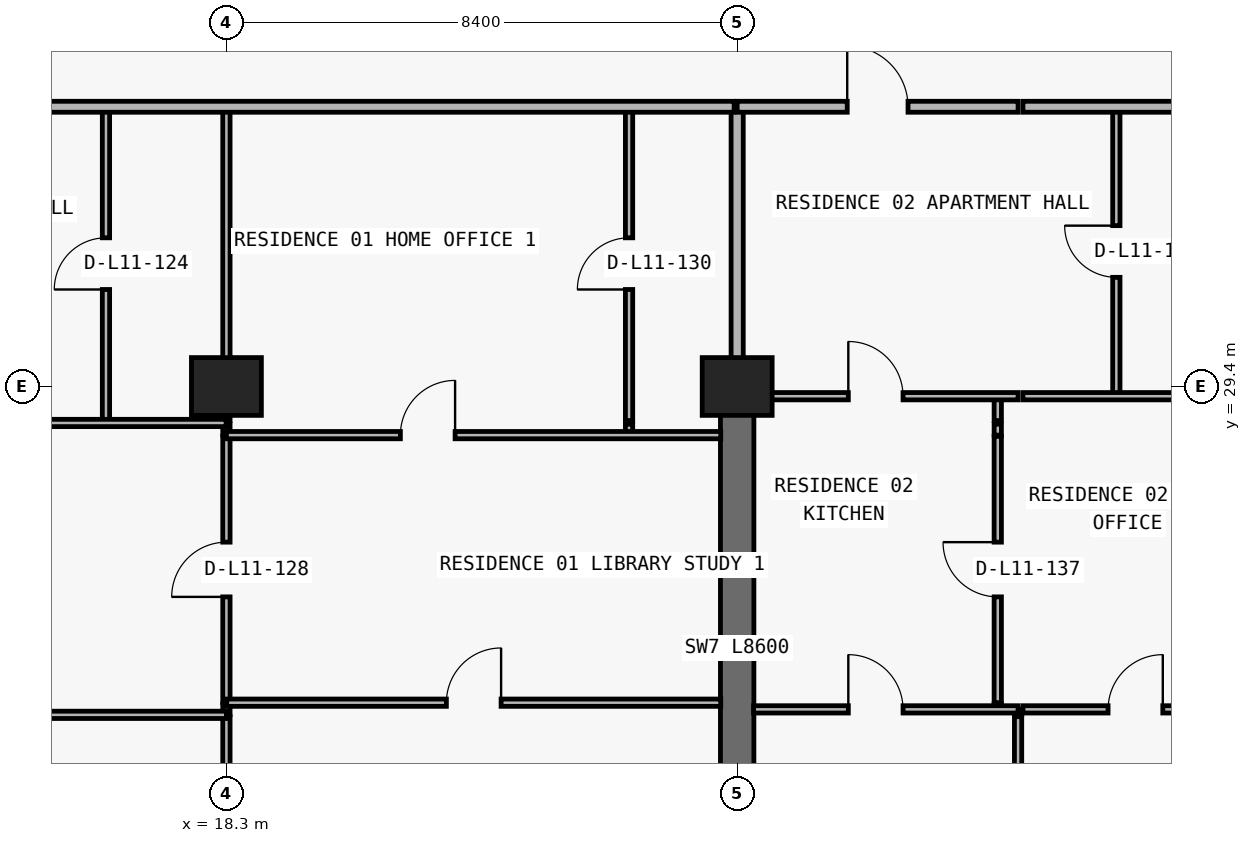
"""IFC4 building model, lengths in metres.
Left out: names, types, materials, properties, quantities, classifications, styles, units other than length and angle.
Written with IfcOpenShell. Run it as: python <this file> out.ifc"""

import sys

from ifc_helpers import new_model, si_unit, direction, frame, frame_2d, origin, origin_2d, place, context, subcontext, project, spatial, rectangle, extrude, element, fill, save


model = new_model("IFC4")
c1 = context("Model", 3, precision=1e-05, world=origin(), true_north=direction((0.0, 1.0)))
c2 = subcontext(c1, "Body", "Model", "MODEL_VIEW")
j1 = project(units=[si_unit("LENGTHUNIT", "METRE"), si_unit("PLANEANGLEUNIT", "RADIAN")], contexts=[c1])
p1 = place(None, origin())
s1 = spatial("IfcSite", under=j1, at=p1, CompositionType="ELEMENT")
p2 = place(p1, origin())
s2 = spatial("IfcBuilding", under=s1, at=p2, CompositionType="ELEMENT")
p3 = place(p2, frame((0.0, 0.0, 46.5)))
s3 = spatial("IfcBuildingStorey", under=s2, at=p3, CompositionType="ELEMENT", Elevation=46.5)
for number, where, z_axis, x_axis in (
    (1, (18.3, 29.4, 0.0), (0.0, 0.0, 1.0), (1.0, 0.0, 0.0)),
    (2, (26.7, 29.4, 0.0), (0.0, 0.0, 1.0), (1.0, 0.0, 0.0)),
):
    element("IfcColumn", number, at=place(p3, frame(where, z_axis=z_axis, x_axis=x_axis)), inside=s3, PredefinedType="COLUMN", context=c2, shape_type="SweptSolid", body=[
        extrude(rectangle(XDim=1.15, YDim=0.95, at=origin_2d()), origin(), (0.0, 0.0, 1.0), 3.05),
    ])
p4 = place(p3, frame((26.7, 20.8, 0.0), z_axis=(0.0, 0.0, 1.0), x_axis=(0.0, 1.0, 0.0)))
e3 = element("IfcWall", 3, at=p4, inside=s3, PredefinedType="SHEAR", context=c2, shape_type="SweptSolid", body=[
    extrude(rectangle(XDim=8.6, YDim=0.55, at=frame_2d((4.3, 0.0))), origin(), (0.0, 0.0, 1.0), 3.05),
])
p5 = place(p3, frame((16.319, 28.84, 0.0), z_axis=(0.0, 0.0, 1.0), x_axis=(0.0, 1.0, 0.0)))
e4 = element("IfcWall", 4, at=p5, inside=s3, PredefinedType="PARTITIONING", context=c2, shape_type="SweptSolid", body=[
    extrude(rectangle(XDim=5.16, YDim=0.12, at=frame_2d((2.58, 0.0))), origin(), (0.0, 0.0, 1.0), 3.05),
])
p6 = place(p5, frame((2.155, 0.0, 0.0)))
e5 = element("IfcOpeningElement", 5, at=p6, cuts=e4, PredefinedType="OPENING", context=c2, shape_type="SweptSolid", body=[
    extrude(rectangle(XDim=0.85, YDim=2.1, at=frame_2d((0.425, 1.05))), frame((0.0, 0.07, 0.0), z_axis=(0.0, -1.0, 0.0), x_axis=(1.0, 0.0, 0.0)), (0.0, 0.0, 1.0), 0.14),
])
p7 = place(p3, frame((18.3, 6.24, 0.0), z_axis=(0.0, 0.0, 1.0), x_axis=(0.0, 1.0, 0.0)))
e6 = element("IfcWall", 6, at=p7, inside=s3, PredefinedType="PARTITIONING", context=c2, shape_type="SweptSolid", body=[
    extrude(rectangle(XDim=17.73, YDim=0.12, at=frame_2d((8.865, 0.0))), origin(), (0.0, 0.0, 1.0), 2.11),
])
p8 = place(p3, frame((18.3, 24.0, 0.0), z_axis=(0.0, 0.0, 1.0), x_axis=(0.0, 1.0, 0.0)))
e7 = element("IfcWall", 7, at=p8, inside=s3, PredefinedType="PARTITIONING", context=c2, shape_type="SweptSolid", body=[
    extrude(rectangle(XDim=0.18, YDim=0.12, at=frame_2d((0.09, 0.0))), origin(), (0.0, 0.0, 1.0), 2.11),
])
p9 = place(p3, frame((18.3, 24.2, 0.0), z_axis=(0.0, 0.0, 1.0), x_axis=(0.0, 1.0, 0.0)))
e8 = element("IfcWall", 8, at=p9, inside=s3, PredefinedType="PARTITIONING", context=c2, shape_type="SweptSolid", body=[
    extrude(rectangle(XDim=4.38, YDim=0.12, at=frame_2d((2.19, 0.0))), origin(), (0.0, 0.0, 1.0), 2.11),
])
p10 = place(p9, frame((1.74, 0.0, 0.0)))
e9 = element("IfcOpeningElement", 9, at=p10, cuts=e8, PredefinedType="OPENING", context=c2, shape_type="SweptSolid", body=[
    extrude(rectangle(XDim=0.9, YDim=2.06, at=frame_2d((0.45, 1.03))), frame((0.0, 0.07, 0.0), z_axis=(0.0, -1.0, 0.0), x_axis=(1.0, 0.0, 0.0)), (0.0, 0.0, 1.0), 0.14),
])
p11 = place(p3, frame((18.3, 28.6, 0.0), z_axis=(0.0, 0.0, 1.0), x_axis=(0.0, 1.0, 0.0)))
e10 = element("IfcWall", 10, at=p11, inside=s3, PredefinedType="PARTITIONING", context=c2, shape_type="SweptSolid", body=[
    extrude(rectangle(XDim=0.18, YDim=0.12, at=frame_2d((0.09, 0.0))), origin(), (0.0, 0.0, 1.0), 2.11),
])
p12 = place(p3, frame((18.3, 28.84, 0.0), z_axis=(0.0, 0.0, 1.0), x_axis=(0.0, 1.0, 0.0)))
e11 = element("IfcWall", 11, at=p12, inside=s3, PredefinedType="PARTITIONING", context=c2, shape_type="SweptSolid", body=[
    extrude(rectangle(XDim=5.16, YDim=0.12, at=frame_2d((2.58, 0.0))), origin(), (0.0, 0.0, 1.0), 2.11),
])
p13 = place(p3, frame((24.922, 28.6, 0.0), z_axis=(0.0, 0.0, 1.0), x_axis=(0.0, 1.0, 0.0)))
e12 = element("IfcWall", 12, at=p13, inside=s3, PredefinedType="PARTITIONING", context=c2, shape_type="SweptSolid", body=[
    extrude(rectangle(XDim=0.18, YDim=0.12, at=frame_2d((0.09, 0.0))), origin(), (0.0, 0.0, 1.0), 3.05),
])
p14 = place(p3, frame((24.922, 28.84, 0.0), z_axis=(0.0, 0.0, 1.0), x_axis=(0.0, 1.0, 0.0)))
e13 = element("IfcWall", 13, at=p14, inside=s3, PredefinedType="PARTITIONING", context=c2, shape_type="SweptSolid", body=[
    extrude(rectangle(XDim=5.16, YDim=0.12, at=frame_2d((2.58, 0.0))), origin(), (0.0, 0.0, 1.0), 3.05),
])
p15 = place(p14, frame((2.155, 0.0, 0.0)))
e14 = element("IfcOpeningElement", 14, at=p15, cuts=e13, PredefinedType="OPENING", context=c2, shape_type="SweptSolid", body=[
    extrude(rectangle(XDim=0.85, YDim=2.1, at=frame_2d((0.425, 1.05))), frame((0.0, 0.07, 0.0), z_axis=(0.0, -1.0, 0.0), x_axis=(1.0, 0.0, 0.0)), (0.0, 0.0, 1.0), 0.14),
])
p16 = place(p3, frame((26.7, 29.405, 0.0), z_axis=(0.0, 0.0, 1.0), x_axis=(0.0, 1.0, 0.0)))
e15 = element("IfcWall", 15, at=p16, inside=s3, PredefinedType="PARTITIONING", context=c2, shape_type="SweptSolid", body=[
    extrude(rectangle(XDim=4.595, YDim=0.2, at=frame_2d((2.297, 0.0))), origin(), (0.0, 0.0, 1.0), 2.335),
])
p17 = place(p3, frame((30.986, 24.09, 0.0), z_axis=(0.0, 0.0, 1.0), x_axis=(0.0, 1.0, 0.0)))
e16 = element("IfcWall", 16, at=p17, inside=s3, PredefinedType="PARTITIONING", context=c2, shape_type="SweptSolid", body=[
    extrude(rectangle(XDim=0.09, YDim=0.12, at=frame_2d((0.045, 0.0))), origin(), (0.0, 0.0, 1.0), 3.05),
])
p18 = place(p3, frame((30.986, 24.2, 0.0), z_axis=(0.0, 0.0, 1.0), x_axis=(0.0, 1.0, 0.0)))
e17 = element("IfcWall", 17, at=p18, inside=s3, PredefinedType="PARTITIONING", context=c2, shape_type="SweptSolid", body=[
    extrude(rectangle(XDim=4.38, YDim=0.12, at=frame_2d((2.19, 0.0))), origin(), (0.0, 0.0, 1.0), 3.05),
])
p19 = place(p18, frame((1.74, 0.0, 0.0)))
e18 = element("IfcOpeningElement", 18, at=p19, cuts=e17, PredefinedType="OPENING", context=c2, shape_type="SweptSolid", body=[
    extrude(rectangle(XDim=0.9, YDim=2.15, at=frame_2d((0.45, 1.075))), frame((0.0, 0.07, 0.0), z_axis=(0.0, -1.0, 0.0), x_axis=(1.0, 0.0, 0.0)), (0.0, 0.0, 1.0), 0.14),
])
p20 = place(p3, frame((30.986, 28.6, 0.0), z_axis=(0.0, 0.0, 1.0), x_axis=(0.0, 1.0, 0.0)))
e19 = element("IfcWall", 19, at=p20, inside=s3, PredefinedType="PARTITIONING", context=c2, shape_type="SweptSolid", body=[
    extrude(rectangle(XDim=0.18, YDim=0.12, at=frame_2d((0.09, 0.0))), origin(), (0.0, 0.0, 1.0), 3.05),
])
p21 = place(p3, frame((30.986, 28.84, 0.0), z_axis=(0.0, 0.0, 1.0), x_axis=(0.0, 1.0, 0.0)))
e20 = element("IfcWall", 20, at=p21, inside=s3, PredefinedType="PARTITIONING", context=c2, shape_type="SweptSolid", body=[
    extrude(rectangle(XDim=0.4, YDim=0.12, at=frame_2d((0.2, 0.0))), origin(), (0.0, 0.0, 1.0), 3.05),
])
p22 = place(p3, frame((31.32, 6.24, 0.0), z_axis=(0.0, 0.0, 1.0), x_axis=(0.0, 1.0, 0.0)))
e21 = element("IfcWall", 21, at=p22, inside=s3, PredefinedType="PARTITIONING", context=c2, shape_type="SweptSolid", body=[
    extrude(rectangle(XDim=17.73, YDim=0.12, at=frame_2d((8.865, 0.0))), origin(), (0.0, 0.0, 1.0), 3.05),
])
p23 = place(p3, frame((31.32, 24.0, 0.0), z_axis=(0.0, 0.0, 1.0), x_axis=(0.0, 1.0, 0.0)))
e22 = element("IfcWall", 22, at=p23, inside=s3, PredefinedType="PARTITIONING", context=c2, shape_type="SweptSolid", body=[
    extrude(rectangle(XDim=0.09, YDim=0.12, at=frame_2d((0.045, 0.0))), origin(), (0.0, 0.0, 1.0), 3.05),
])
p24 = place(p3, frame((32.936, 29.24, 0.0), z_axis=(0.0, 0.0, 1.0), x_axis=(0.0, 1.0, 0.0)))
e23 = element("IfcWall", 23, at=p24, inside=s3, PredefinedType="PARTITIONING", context=c2, shape_type="SweptSolid", body=[
    extrude(rectangle(XDim=4.76, YDim=0.12, at=frame_2d((2.38, 0.0))), origin(), (0.0, 0.0, 1.0), 3.05),
])
p25 = place(p24, frame((1.955, 0.0, 0.0)))
e24 = element("IfcOpeningElement", 24, at=p25, cuts=e23, PredefinedType="OPENING", context=c2, shape_type="SweptSolid", body=[
    extrude(rectangle(XDim=0.85, YDim=2.1, at=frame_2d((0.425, 1.05))), frame((0.0, 0.07, 0.0), z_axis=(0.0, -1.0, 0.0), x_axis=(1.0, 0.0, 0.0)), (0.0, 0.0, 1.0), 0.14),
])
p26 = place(p3, frame((9.9, 24.0, 0.0), z_axis=(0.0, 0.0, 1.0), x_axis=(1.0, 0.0, 0.0)))
e25 = element("IfcWall", 25, at=p26, inside=s3, PredefinedType="PARTITIONING", context=c2, shape_type="SweptSolid", body=[
    extrude(rectangle(XDim=8.4, YDim=0.12, at=frame_2d((4.2, 0.0))), origin(), (0.0, 0.0, 1.0), 3.05),
])
p27 = place(p26, frame((1.44, 0.0, 0.0)))
e26 = element("IfcOpeningElement", 26, at=p27, cuts=e25, PredefinedType="OPENING", context=c2, shape_type="SweptSolid", body=[
    extrude(rectangle(XDim=0.9, YDim=2.15, at=frame_2d((0.45, 1.075))), frame((0.0, 0.07, 0.0), z_axis=(0.0, -1.0, 0.0), x_axis=(1.0, 0.0, 0.0)), (0.0, 0.0, 1.0), 0.14),
])
p28 = place(p3, frame((26.97, 24.09, 0.0), z_axis=(0.0, 0.0, 1.0), x_axis=(1.0, 0.0, 0.0)))
e27 = element("IfcWall", 27, at=p28, inside=s3, PredefinedType="PARTITIONING", context=c2, shape_type="SweptSolid", body=[
    extrude(rectangle(XDim=4.35, YDim=0.12, at=frame_2d((2.175, 0.0))), origin(), (0.0, 0.0, 1.0), 3.05),
])
p29 = place(p28, frame((1.558, 0.0, 0.0)))
e28 = element("IfcOpeningElement", 28, at=p29, cuts=e27, PredefinedType="OPENING", context=c2, shape_type="SweptSolid", body=[
    extrude(rectangle(XDim=0.9, YDim=2.15, at=frame_2d((0.45, 1.075))), frame((0.0, 0.07, 0.0), z_axis=(0.0, -1.0, 0.0), x_axis=(1.0, 0.0, 0.0)), (0.0, 0.0, 1.0), 0.14),
])
p30 = place(p3, frame((31.4, 24.09, 0.0), z_axis=(0.0, 0.0, 1.0), x_axis=(1.0, 0.0, 0.0)))
e29 = element("IfcWall", 29, at=p30, inside=s3, PredefinedType="PARTITIONING", context=c2, shape_type="SweptSolid", body=[
    extrude(rectangle(XDim=3.7, YDim=0.12, at=frame_2d((1.85, 0.0))), origin(), (0.0, 0.0, 1.0), 3.05),
])
p31 = place(p30, frame((1.4, 0.0, 0.0)))
e30 = element("IfcOpeningElement", 30, at=p31, cuts=e29, PredefinedType="OPENING", context=c2, shape_type="SweptSolid", body=[
    extrude(rectangle(XDim=0.9, YDim=2.15, at=frame_2d((0.45, 1.075))), frame((0.0, 0.07, 0.0), z_axis=(0.0, -1.0, 0.0), x_axis=(1.0, 0.0, 0.0)), (0.0, 0.0, 1.0), 0.14),
])
p32 = place(p3, frame((18.305, 24.2, 0.0), z_axis=(0.0, 0.0, 1.0), x_axis=(1.0, 0.0, 0.0)))
e31 = element("IfcWall", 31, at=p32, inside=s3, PredefinedType="PARTITIONING", context=c2, shape_type="SweptSolid", body=[
    extrude(rectangle(XDim=8.125, YDim=0.12, at=frame_2d((4.062, 0.0))), origin(), (0.0, 0.0, 1.0), 3.05),
])
p33 = place(p32, frame((3.613, 0.0, 0.0)))
e32 = element("IfcOpeningElement", 32, at=p33, cuts=e31, PredefinedType="OPENING", context=c2, shape_type="SweptSolid", body=[
    extrude(rectangle(XDim=0.9, YDim=2.15, at=frame_2d((0.45, 1.075))), frame((0.0, 0.07, 0.0), z_axis=(0.0, -1.0, 0.0), x_axis=(1.0, 0.0, 0.0)), (0.0, 0.0, 1.0), 0.14),
])
p34 = place(p3, frame((18.3, 28.6, 0.0), z_axis=(0.0, 0.0, 1.0), x_axis=(1.0, 0.0, 0.0)))
e33 = element("IfcWall", 33, at=p34, inside=s3, PredefinedType="PARTITIONING", context=c2, shape_type="SweptSolid", body=[
    extrude(rectangle(XDim=8.13, YDim=0.12, at=frame_2d((4.065, 0.0))), origin(), (0.0, 0.0, 1.0), 3.05),
])
p35 = place(p34, frame((2.861, 0.0, 0.0)))
e34 = element("IfcOpeningElement", 34, at=p35, cuts=e33, PredefinedType="OPENING", context=c2, shape_type="SweptSolid", body=[
    extrude(rectangle(XDim=0.9, YDim=2.15, at=frame_2d((0.45, 1.075))), frame((0.0, 0.07, 0.0), z_axis=(0.0, -1.0, 0.0), x_axis=(1.0, 0.0, 0.0)), (0.0, 0.0, 1.0), 0.14),
])
p36 = place(p3, frame((9.9, 28.8, 0.0), z_axis=(0.0, 0.0, 1.0), x_axis=(1.0, 0.0, 0.0)))
e35 = element("IfcWall", 35, at=p36, inside=s3, PredefinedType="PARTITIONING", context=c2, shape_type="SweptSolid", body=[
    extrude(rectangle(XDim=8.395, YDim=0.12, at=frame_2d((4.198, 0.0))), origin(), (0.0, 0.0, 1.0), 3.05),
])
p37 = place(p36, frame((1.44, 0.0, 0.0)))
e36 = element("IfcOpeningElement", 36, at=p37, cuts=e35, PredefinedType="OPENING", context=c2, shape_type="SweptSolid", body=[
    extrude(rectangle(XDim=0.9, YDim=2.15, at=frame_2d((0.45, 1.075))), frame((0.0, 0.07, 0.0), z_axis=(0.0, -1.0, 0.0), x_axis=(1.0, 0.0, 0.0)), (0.0, 0.0, 1.0), 0.14),
])
p38 = place(p3, frame((26.97, 29.24, 0.0), z_axis=(0.0, 0.0, 1.0), x_axis=(1.0, 0.0, 0.0)))
e37 = element("IfcWall", 37, at=p38, inside=s3, PredefinedType="PARTITIONING", context=c2, shape_type="SweptSolid", body=[
    extrude(rectangle(XDim=4.35, YDim=0.12, at=frame_2d((2.175, 0.0))), origin(), (0.0, 0.0, 1.0), 2.11),
])
p39 = place(p38, frame((1.558, 0.0, 0.0)))
e38 = element("IfcOpeningElement", 38, at=p39, cuts=e37, PredefinedType="OPENING", context=c2, shape_type="SweptSolid", body=[
    extrude(rectangle(XDim=0.9, YDim=2.06, at=frame_2d((0.45, 1.03))), frame((0.0, 0.07, 0.0), z_axis=(0.0, -1.0, 0.0), x_axis=(1.0, 0.0, 0.0)), (0.0, 0.0, 1.0), 0.14),
])
p40 = place(p3, frame((31.4, 29.24, 0.0), z_axis=(0.0, 0.0, 1.0), x_axis=(1.0, 0.0, 0.0)))
e39 = element("IfcWall", 39, at=p40, inside=s3, PredefinedType="PARTITIONING", context=c2, shape_type="SweptSolid", body=[
    extrude(rectangle(XDim=3.7, YDim=0.12, at=frame_2d((1.85, 0.0))), origin(), (0.0, 0.0, 1.0), 2.11),
])
p41 = place(p3, frame((5.105, 34.0, 0.0), z_axis=(0.0, 0.0, 1.0), x_axis=(1.0, 0.0, 0.0)))
e40 = element("IfcWall", 40, at=p41, inside=s3, PredefinedType="PARTITIONING", context=c2, shape_type="SweptSolid", body=[
    extrude(rectangle(XDim=21.545, YDim=0.18, at=frame_2d((10.772, 0.0))), origin(), (0.0, 0.0, 1.0), 3.05),
])
p42 = place(p41, frame((7.504, 0.0, 0.0)))
e41 = element("IfcOpeningElement", 41, at=p42, cuts=e40, PredefinedType="OPENING", context=c2, shape_type="SweptSolid", body=[
    extrude(rectangle(XDim=1.0, YDim=2.2, at=frame_2d((0.5, 1.1))), frame((0.0, 0.1, 0.0), z_axis=(0.0, -1.0, 0.0), x_axis=(1.0, 0.0, 0.0)), (0.0, 0.0, 1.0), 0.2),
])
p43 = place(p3, frame((26.7, 34.0, 0.0), z_axis=(0.0, 0.0, 1.0), x_axis=(1.0, 0.0, 0.0)))
e42 = element("IfcWall", 42, at=p43, inside=s3, PredefinedType="PARTITIONING", context=c2, shape_type="SweptSolid", body=[
    extrude(rectangle(XDim=4.62, YDim=0.18, at=frame_2d((2.31, 0.0))), origin(), (0.0, 0.0, 1.0), 3.05),
])
p44 = place(p43, frame((1.81, 0.0, 0.0)))
e43 = element("IfcOpeningElement", 43, at=p44, cuts=e42, PredefinedType="OPENING", context=c2, shape_type="SweptSolid", body=[
    extrude(rectangle(XDim=1.0, YDim=2.2, at=frame_2d((0.5, 1.1))), frame((0.0, 0.1, 0.0), z_axis=(0.0, -1.0, 0.0), x_axis=(1.0, 0.0, 0.0)), (0.0, 0.0, 1.0), 0.2),
])
p45 = place(p3, frame((31.4, 34.0, 0.0), z_axis=(0.0, 0.0, 1.0), x_axis=(1.0, 0.0, 0.0)))
e44 = element("IfcWall", 44, at=p45, inside=s3, PredefinedType="PARTITIONING", context=c2, shape_type="SweptSolid", body=[
    extrude(rectangle(XDim=41.3, YDim=0.18, at=frame_2d((20.65, 0.0))), origin(), (0.0, 0.0, 1.0), 3.05),
])
p46 = place(p45, frame((6.07, 0.0, 0.0)))
e45 = element("IfcOpeningElement", 45, at=p46, cuts=e44, PredefinedType="OPENING", context=c2, shape_type="SweptSolid", body=[
    extrude(rectangle(XDim=1.0, YDim=2.2, at=frame_2d((0.5, 1.1))), frame((0.0, 0.1, 0.0), z_axis=(0.0, -1.0, 0.0), x_axis=(1.0, 0.0, 0.0)), (0.0, 0.0, 1.0), 0.2),
])
p47 = place(p45, frame((13.945, 0.0, 0.0)))
e46 = element("IfcOpeningElement", 46, at=p47, cuts=e44, PredefinedType="OPENING", context=c2, shape_type="SweptSolid", body=[
    extrude(rectangle(XDim=1.0, YDim=2.2, at=frame_2d((0.5, 1.1))), frame((0.0, 0.1, 0.0), z_axis=(0.0, -1.0, 0.0), x_axis=(1.0, 0.0, 0.0)), (0.0, 0.0, 1.0), 0.2),
])
p48 = place(p45, frame((22.414, 0.0, 0.0)))
e47 = element("IfcOpeningElement", 47, at=p48, cuts=e44, PredefinedType="OPENING", context=c2, shape_type="SweptSolid", body=[
    extrude(rectangle(XDim=1.0, YDim=2.2, at=frame_2d((0.5, 1.1))), frame((0.0, 0.1, 0.0), z_axis=(0.0, -1.0, 0.0), x_axis=(1.0, 0.0, 0.0)), (0.0, 0.0, 1.0), 0.2),
])
p49 = place(p6, origin())
e48 = element("IfcDoor", 48, at=p49, inside=s3, OperationType="SINGLE_SWING_LEFT", PredefinedType="DOOR", context=c2, shape_type="SweptSolid", body=[
    extrude(rectangle(XDim=0.85, YDim=2.1, at=frame_2d((0.425, 1.05))), frame((0.0, 0.025, 0.0), z_axis=(0.0, -1.0, 0.0), x_axis=(1.0, 0.0, 0.0)), (0.0, 0.0, 1.0), 0.05),
])
fill(e5, e48)
p50 = place(p10, origin())
e49 = element("IfcDoor", 49, at=p50, inside=s3, OperationType="SINGLE_SWING_LEFT", PredefinedType="DOOR", context=c2, shape_type="SweptSolid", body=[
    extrude(rectangle(XDim=0.9, YDim=2.06, at=frame_2d((0.45, 1.03))), frame((0.0, 0.025, 0.0), z_axis=(0.0, -1.0, 0.0), x_axis=(1.0, 0.0, 0.0)), (0.0, 0.0, 1.0), 0.05),
])
fill(e9, e49)
p51 = place(p35, origin())
e50 = element("IfcDoor", 50, at=p51, inside=s3, OperationType="SINGLE_SWING_RIGHT", PredefinedType="DOOR", context=c2, shape_type="SweptSolid", body=[
    extrude(rectangle(XDim=0.9, YDim=2.15, at=frame_2d((0.45, 1.075))), frame((0.0, 0.025, 0.0), z_axis=(0.0, -1.0, 0.0), x_axis=(1.0, 0.0, 0.0)), (0.0, 0.0, 1.0), 0.05),
])
fill(e34, e50)
p52 = place(p15, origin())
e51 = element("IfcDoor", 51, at=p52, inside=s3, OperationType="SINGLE_SWING_LEFT", PredefinedType="DOOR", context=c2, shape_type="SweptSolid", body=[
    extrude(rectangle(XDim=0.85, YDim=2.1, at=frame_2d((0.425, 1.05))), frame((0.0, 0.025, 0.0), z_axis=(0.0, -1.0, 0.0), x_axis=(1.0, 0.0, 0.0)), (0.0, 0.0, 1.0), 0.05),
])
fill(e14, e51)
p53 = place(p33, origin())
e52 = element("IfcDoor", 52, at=p53, inside=s3, OperationType="SINGLE_SWING_RIGHT", PredefinedType="DOOR", context=c2, shape_type="SweptSolid", body=[
    extrude(rectangle(XDim=0.9, YDim=2.15, at=frame_2d((0.45, 1.075))), frame((0.0, 0.025, 0.0), z_axis=(0.0, -1.0, 0.0), x_axis=(1.0, 0.0, 0.0)), (0.0, 0.0, 1.0), 0.05),
])
fill(e32, e52)
p54 = place(p44, origin())
e53 = element("IfcDoor", 53, at=p54, inside=s3, OperationType="SINGLE_SWING_LEFT", PredefinedType="DOOR", context=c2, shape_type="SweptSolid", body=[
    extrude(rectangle(XDim=1.0, YDim=2.2, at=frame_2d((0.5, 1.1))), frame((0.0, 0.025, 0.0), z_axis=(0.0, -1.0, 0.0), x_axis=(1.0, 0.0, 0.0)), (0.0, 0.0, 1.0), 0.05),
])
fill(e43, e53)
p55 = place(p25, origin())
e54 = element("IfcDoor", 54, at=p55, inside=s3, OperationType="SINGLE_SWING_RIGHT", PredefinedType="DOOR", context=c2, shape_type="SweptSolid", body=[
    extrude(rectangle(XDim=0.85, YDim=2.1, at=frame_2d((0.425, 1.05))), frame((0.0, 0.025, 0.0), z_axis=(0.0, -1.0, 0.0), x_axis=(1.0, 0.0, 0.0)), (0.0, 0.0, 1.0), 0.05),
])
fill(e24, e54)
p56 = place(p39, origin())
e55 = element("IfcDoor", 55, at=p56, inside=s3, OperationType="SINGLE_SWING_LEFT", PredefinedType="DOOR", context=c2, shape_type="SweptSolid", body=[
    extrude(rectangle(XDim=0.9, YDim=2.06, at=frame_2d((0.45, 1.03))), frame((0.0, 0.025, 0.0), z_axis=(0.0, -1.0, 0.0), x_axis=(1.0, 0.0, 0.0)), (0.0, 0.0, 1.0), 0.05),
])
fill(e38, e55)
p57 = place(p19, origin())
e56 = element("IfcDoor", 56, at=p57, inside=s3, OperationType="SINGLE_SWING_RIGHT", PredefinedType="DOOR", context=c2, shape_type="SweptSolid", body=[
    extrude(rectangle(XDim=0.9, YDim=2.15, at=frame_2d((0.45, 1.075))), frame((0.0, 0.025, 0.0), z_axis=(0.0, -1.0, 0.0), x_axis=(1.0, 0.0, 0.0)), (0.0, 0.0, 1.0), 0.05),
])
fill(e18, e56)
p58 = place(p29, origin())
e57 = element("IfcDoor", 57, at=p58, inside=s3, OperationType="SINGLE_SWING_LEFT", PredefinedType="DOOR", context=c2, shape_type="SweptSolid", body=[
    extrude(rectangle(XDim=0.9, YDim=2.15, at=frame_2d((0.45, 1.075))), frame((0.0, 0.025, 0.0), z_axis=(0.0, -1.0, 0.0), x_axis=(1.0, 0.0, 0.0)), (0.0, 0.0, 1.0), 0.05),
])
fill(e28, e57)
p59 = place(p31, origin())
e58 = element("IfcDoor", 58, at=p59, inside=s3, OperationType="SINGLE_SWING_RIGHT", PredefinedType="DOOR", context=c2, shape_type="SweptSolid", body=[
    extrude(rectangle(XDim=0.9, YDim=2.15, at=frame_2d((0.45, 1.075))), frame((0.0, 0.025, 0.0), z_axis=(0.0, -1.0, 0.0), x_axis=(1.0, 0.0, 0.0)), (0.0, 0.0, 1.0), 0.05),
])
fill(e30, e58)
save(model, sys.argv[1])
